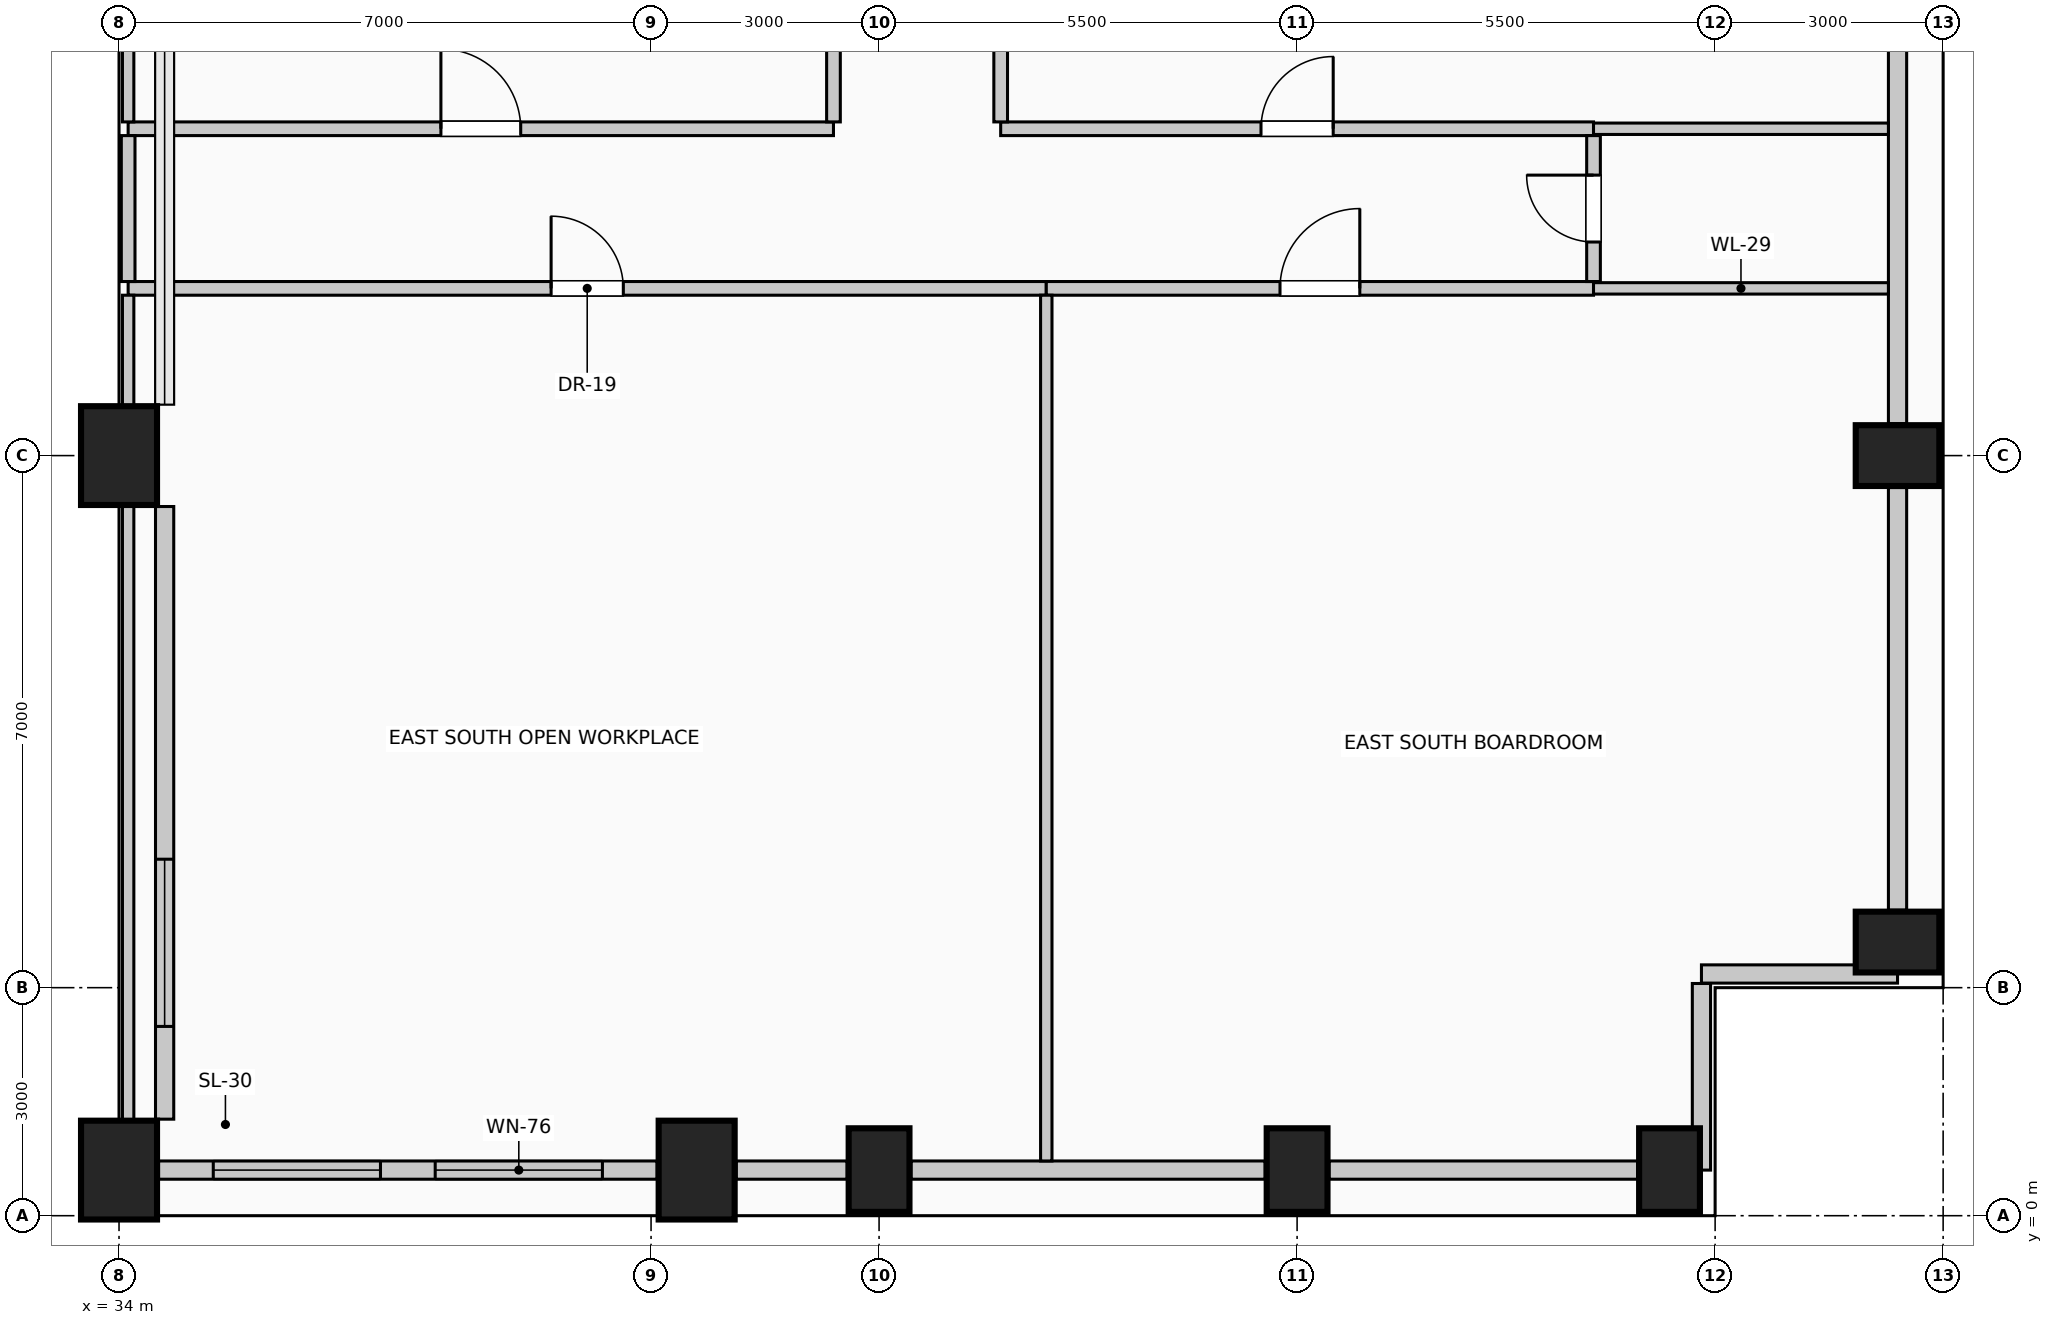
"""IFC4 building model, lengths in metres.
Left out: names, types, materials, properties, quantities, classifications, styles, units other than length and angle.
Written with IfcOpenShell. Run it as: python <this file> out.ifc"""

import sys

from ifc_helpers import new_model, si_unit, direction, frame, frame_2d, origin, origin_2d, place, context, subcontext, project, spatial, rectangle, extrude, element, fill, save


model = new_model("IFC4")
c1 = context("Model", 3, precision=1e-05, world=origin(), true_north=direction((0.0, 1.0)))
c2 = subcontext(c1, "Body", "Model", "MODEL_VIEW")
j1 = project(units=[si_unit("LENGTHUNIT", "METRE"), si_unit("PLANEANGLEUNIT", "RADIAN")], contexts=[c1])
p1 = place(None, origin())
s1 = spatial("IfcSite", under=j1, at=p1, CompositionType="ELEMENT")
p2 = place(p1, origin())
s2 = spatial("IfcBuilding", under=s1, at=p2, CompositionType="ELEMENT")
p3 = place(p2, frame((0.0, 0.0, 190.6)))
s3 = spatial("IfcBuildingStorey", under=s2, at=p3, CompositionType="ELEMENT", Elevation=190.6)
for number, where, z_axis, x_axis in (
    (1, (34.0, 0.6, 0.0), (0.0, 0.0, 1.0), (1.0, 0.0, 0.0)),
    (2, (41.6, 0.6, 0.0), (0.0, 0.0, 1.0), (1.0, 0.0, 0.0)),
):
    element("IfcColumn", number, at=place(p3, frame(where, z_axis=z_axis, x_axis=x_axis)), inside=s3, PredefinedType="COLUMN", context=c2, shape_type="SweptSolid", body=[
        extrude(rectangle(XDim=1.0, YDim=1.3, at=origin_2d()), origin(), (0.0, 0.0, 1.0), 4.0),
    ])
for number, where, z_axis, x_axis in (
    (3, (44.0, 0.6, 0.0), (0.0, 0.0, 1.0), (1.0, 0.0, 0.0)),
    (4, (49.5, 0.6, 0.0), (0.0, 0.0, 1.0), (1.0, 0.0, 0.0)),
    (5, (54.4, 0.6, 0.0), (0.0, 0.0, 1.0), (1.0, 0.0, 0.0)),
    (6, (57.4, 3.6, 0.0), (0.0, 0.0, 1.0), (0.0, 1.0, 0.0)),
    (7, (57.4, 10.0, 0.0), (0.0, 0.0, 1.0), (0.0, 1.0, 0.0)),
):
    element("IfcColumn", number, at=place(p3, frame(where, z_axis=z_axis, x_axis=x_axis)), inside=s3, PredefinedType="COLUMN", context=c2, shape_type="SweptSolid", body=[
        extrude(rectangle(XDim=0.8, YDim=1.1, at=origin_2d()), origin(), (0.0, 0.0, 1.0), 4.0),
    ])
p4 = place(p3, frame((34.0, 10.0, 0.0), z_axis=(0.0, 0.0, 1.0), x_axis=(1.0, 0.0, 0.0)))
e8 = element("IfcColumn", 8, at=p4, inside=s3, PredefinedType="COLUMN", context=c2, shape_type="SweptSolid", body=[
    extrude(rectangle(XDim=1.0, YDim=1.3, at=origin_2d()), origin(), (0.0, 0.0, 1.0), 4.0),
])
p5 = place(p3, frame((41.08, 0.6, 0.0), z_axis=(0.0, 0.0, 1.0), x_axis=(-1.0, 0.0, 0.0)))
e9 = element("IfcWall", 9, at=p5, inside=s3, PredefinedType="SOLIDWALL", context=c2, shape_type="SweptSolid", body=[
    extrude(rectangle(XDim=6.56, YDim=0.24, at=frame_2d((3.28, 0.0))), origin(), (0.0, 0.0, 1.0), 3.0),
])
p6 = place(p5, frame((0.72, 0.0, 0.42)))
e10 = element("IfcOpeningElement", 10, at=p6, cuts=e9, PredefinedType="OPENING", context=c2, shape_type="SweptSolid", body=[
    extrude(rectangle(XDim=2.2, YDim=1.95, at=frame_2d((1.1, 0.975))), frame((0.0, 0.13, 0.0), z_axis=(0.0, -1.0, 0.0), x_axis=(1.0, 0.0, 0.0)), (0.0, 0.0, 1.0), 0.26),
])
p7 = place(p5, frame((3.64, 0.0, 0.42)))
e11 = element("IfcOpeningElement", 11, at=p7, cuts=e9, PredefinedType="OPENING", context=c2, shape_type="SweptSolid", body=[
    extrude(rectangle(XDim=2.2, YDim=1.95, at=frame_2d((1.1, 0.975))), frame((0.0, 0.13, 0.0), z_axis=(0.0, -1.0, 0.0), x_axis=(1.0, 0.0, 0.0)), (0.0, 0.0, 1.0), 0.26),
])
p8 = place(p3, frame((43.58, 0.6, 0.0), z_axis=(0.0, 0.0, 1.0), x_axis=(-1.0, 0.0, 0.0)))
e12 = element("IfcWall", 12, at=p8, inside=s3, PredefinedType="SOLIDWALL", context=c2, shape_type="SweptSolid", body=[
    extrude(rectangle(XDim=1.46, YDim=0.24, at=frame_2d((0.73, 0.0))), origin(), (0.0, 0.0, 1.0), 3.0),
])
p9 = place(p3, frame((49.08, 0.6, 0.0), z_axis=(0.0, 0.0, 1.0), x_axis=(-1.0, 0.0, 0.0)))
e13 = element("IfcWall", 13, at=p9, inside=s3, PredefinedType="SOLIDWALL", context=c2, shape_type="SweptSolid", body=[
    extrude(rectangle(XDim=4.66, YDim=0.24, at=frame_2d((2.33, 0.0))), origin(), (0.0, 0.0, 1.0), 3.0),
])
p10 = place(p3, frame((53.98, 0.6, 0.0), z_axis=(0.0, 0.0, 1.0), x_axis=(-1.0, 0.0, 0.0)))
e14 = element("IfcWall", 14, at=p10, inside=s3, PredefinedType="SOLIDWALL", context=c2, shape_type="SweptSolid", body=[
    extrude(rectangle(XDim=4.06, YDim=0.24, at=frame_2d((2.03, 0.0))), origin(), (0.0, 0.0, 1.0), 3.0),
])
p11 = place(p3, frame((57.4, 9.58, 0.0), z_axis=(0.0, 0.0, 1.0), x_axis=(0.0, -1.0, 0.0)))
e15 = element("IfcWall", 15, at=p11, inside=s3, PredefinedType="SOLIDWALL", context=c2, shape_type="SweptSolid", body=[
    extrude(rectangle(XDim=5.56, YDim=0.24, at=frame_2d((2.78, 0.0))), origin(), (0.0, 0.0, 1.0), 3.0),
])
p12 = place(p3, frame((57.4, 17.58, 0.0), z_axis=(0.0, 0.0, 1.0), x_axis=(0.0, -1.0, 0.0)))
e16 = element("IfcWall", 16, at=p12, inside=s3, PredefinedType="SOLIDWALL", context=c2, shape_type="SweptSolid", body=[
    extrude(rectangle(XDim=7.16, YDim=0.24, at=frame_2d((3.58, 0.0))), origin(), (0.0, 0.0, 1.0), 3.0),
])
p13 = place(p3, frame((57.4, 3.18, 0.0), z_axis=(0.0, 0.0, 1.0), x_axis=(-1.0, 0.0, 0.0)))
e17 = element("IfcWall", 17, at=p13, inside=s3, PredefinedType="SOLIDWALL", context=c2, shape_type="SweptSolid", body=[
    extrude(rectangle(XDim=2.58, YDim=0.24, at=frame_2d((1.29, 0.0))), origin(), (0.0, 0.0, 1.0), 3.75),
])
p14 = place(p3, frame((54.82, 3.055, 0.0), z_axis=(0.0, 0.0, 1.0), x_axis=(0.0, -1.0, 0.0)))
e18 = element("IfcWall", 18, at=p14, inside=s3, PredefinedType="SOLIDWALL", context=c2, shape_type="SweptSolid", body=[
    extrude(rectangle(XDim=2.455, YDim=0.24, at=frame_2d((1.228, 0.0))), origin(), (0.0, 0.0, 1.0), 3.75),
])
p15 = place(p3, frame((34.6, 1.27, 0.0), z_axis=(0.0, 0.0, 1.0), x_axis=(0.0, 1.0, 0.0)))
e19 = element("IfcWall", 19, at=p15, inside=s3, PredefinedType="SOLIDWALL", context=c2, shape_type="SweptSolid", body=[
    extrude(rectangle(XDim=8.06, YDim=0.24, at=frame_2d((4.03, 0.0))), origin(), (0.0, 0.0, 1.0), 3.75),
])
p16 = place(p15, frame((1.22, 0.0, 0.42)))
e20 = element("IfcOpeningElement", 20, at=p16, cuts=e19, PredefinedType="OPENING", context=c2, shape_type="SweptSolid", body=[
    extrude(rectangle(XDim=2.2, YDim=1.95, at=frame_2d((1.1, 0.975))), frame((0.0, 0.13, 0.0), z_axis=(0.0, -1.0, 0.0), x_axis=(1.0, 0.0, 0.0)), (0.0, 0.0, 1.0), 0.26),
])
p17 = place(p3, frame((34.12, 12.2, 0.0), z_axis=(0.0, 0.0, 1.0), x_axis=(1.0, 0.0, 0.0)))
e21 = element("IfcWall", 21, at=p17, inside=s3, PredefinedType="PARTITIONING", context=c2, shape_type="SweptSolid", body=[
    extrude(rectangle(XDim=12.08, YDim=0.18, at=frame_2d((6.04, 0.0))), origin(), (0.0, 0.0, 1.0), 3.75),
])
p18 = place(p17, frame((5.565, 0.0, 0.0)))
e22 = element("IfcOpeningElement", 22, at=p18, cuts=e21, PredefinedType="OPENING", context=c2, shape_type="SweptSolid", body=[
    extrude(rectangle(XDim=0.95, YDim=2.15, at=frame_2d((0.475, 1.075))), frame((0.0, 0.1, 0.0), z_axis=(0.0, -1.0, 0.0), x_axis=(1.0, 0.0, 0.0)), (0.0, 0.0, 1.0), 0.2),
])
p19 = place(p3, frame((46.2, 12.2, 0.0), z_axis=(0.0, 0.0, 1.0), x_axis=(1.0, 0.0, 0.0)))
e23 = element("IfcWall", 23, at=p19, inside=s3, PredefinedType="PARTITIONING", context=c2, shape_type="SweptSolid", body=[
    extrude(rectangle(XDim=7.2, YDim=0.18, at=frame_2d((3.6, 0.0))), origin(), (0.0, 0.0, 1.0), 3.75),
])
p20 = place(p19, frame((3.075, 0.0, 0.0)))
e24 = element("IfcOpeningElement", 24, at=p20, cuts=e23, PredefinedType="OPENING", context=c2, shape_type="SweptSolid", body=[
    extrude(rectangle(XDim=1.05, YDim=2.15, at=frame_2d((0.525, 1.075))), frame((0.0, 0.1, 0.0), z_axis=(0.0, -1.0, 0.0), x_axis=(1.0, 0.0, 0.0)), (0.0, 0.0, 1.0), 0.2),
])
p21 = place(p3, frame((53.4, 12.2, 0.0), z_axis=(0.0, 0.0, 1.0), x_axis=(1.0, 0.0, 0.0)))
e25 = element("IfcWall", 25, at=p21, inside=s3, PredefinedType="PARTITIONING", context=c2, shape_type="SweptSolid", body=[
    extrude(rectangle(XDim=3.88, YDim=0.15, at=frame_2d((1.94, 0.0))), origin(), (0.0, 0.0, 1.0), 3.75),
])
p22 = place(p3, frame((34.12, 14.3, 0.0), z_axis=(0.0, 0.0, 1.0), x_axis=(1.0, 0.0, 0.0)))
e26 = element("IfcWall", 26, at=p22, inside=s3, PredefinedType="PARTITIONING", context=c2, shape_type="SweptSolid", body=[
    extrude(rectangle(XDim=9.28, YDim=0.18, at=frame_2d((4.64, 0.0))), origin(), (0.0, 0.0, 1.0), 3.75),
])
p23 = place(p22, frame((4.115, 0.0, 0.0)))
e27 = element("IfcOpeningElement", 27, at=p23, cuts=e26, PredefinedType="OPENING", context=c2, shape_type="SweptSolid", body=[
    extrude(rectangle(XDim=1.05, YDim=2.15, at=frame_2d((0.525, 1.075))), frame((0.0, 0.1, 0.0), z_axis=(0.0, -1.0, 0.0), x_axis=(1.0, 0.0, 0.0)), (0.0, 0.0, 1.0), 0.2),
])
p24 = place(p3, frame((45.6, 14.3, 0.0), z_axis=(0.0, 0.0, 1.0), x_axis=(1.0, 0.0, 0.0)))
e28 = element("IfcWall", 28, at=p24, inside=s3, PredefinedType="PARTITIONING", context=c2, shape_type="SweptSolid", body=[
    extrude(rectangle(XDim=7.8, YDim=0.18, at=frame_2d((3.9, 0.0))), origin(), (0.0, 0.0, 1.0), 3.75),
])
p25 = place(p24, frame((3.425, 0.0, 0.0)))
e29 = element("IfcOpeningElement", 29, at=p25, cuts=e28, PredefinedType="OPENING", context=c2, shape_type="SweptSolid", body=[
    extrude(rectangle(XDim=0.95, YDim=2.15, at=frame_2d((0.475, 1.075))), frame((0.0, 0.1, 0.0), z_axis=(0.0, -1.0, 0.0), x_axis=(1.0, 0.0, 0.0)), (0.0, 0.0, 1.0), 0.2),
])
p26 = place(p3, frame((53.4, 14.3, 0.0), z_axis=(0.0, 0.0, 1.0), x_axis=(1.0, 0.0, 0.0)))
e30 = element("IfcWall", 30, at=p26, inside=s3, PredefinedType="PARTITIONING", context=c2, shape_type="SweptSolid", body=[
    extrude(rectangle(XDim=3.88, YDim=0.15, at=frame_2d((1.94, 0.0))), origin(), (0.0, 0.0, 1.0), 3.75),
])
p27 = place(p3, frame((34.12, 1.25, 0.0), z_axis=(0.0, 0.0, 1.0), x_axis=(0.0, 1.0, 0.0)))
e31 = element("IfcWall", 31, at=p27, inside=s3, PredefinedType="PARTITIONING", context=c2, shape_type="SweptSolid", body=[
    extrude(rectangle(XDim=8.1, YDim=0.15, at=frame_2d((4.05, 0.0))), origin(), (0.0, 0.0, 1.0), 3.145),
])
p28 = place(p3, frame((34.12, 10.65, 0.0), z_axis=(0.0, 0.0, 1.0), x_axis=(0.0, 1.0, 0.0)))
e32 = element("IfcWall", 32, at=p28, inside=s3, PredefinedType="PARTITIONING", context=c2, shape_type="SweptSolid", body=[
    extrude(rectangle(XDim=1.46, YDim=0.15, at=frame_2d((0.73, 0.0))), origin(), (0.0, 0.0, 1.0), 3.145),
])
p29 = place(p3, frame((34.12, 12.29, 0.0), z_axis=(0.0, 0.0, 1.0), x_axis=(0.0, 1.0, 0.0)))
e33 = element("IfcWall", 33, at=p29, inside=s3, PredefinedType="PARTITIONING", context=c2, shape_type="SweptSolid", body=[
    extrude(rectangle(XDim=1.92, YDim=0.18, at=frame_2d((0.96, 0.0))), origin(), (0.0, 0.0, 1.0), 3.145),
])
p30 = place(p3, frame((34.12, 14.39, 0.0), z_axis=(0.0, 0.0, 1.0), x_axis=(0.0, 1.0, 0.0)))
e34 = element("IfcWall", 34, at=p30, inside=s3, PredefinedType="PARTITIONING", context=c2, shape_type="SweptSolid", body=[
    extrude(rectangle(XDim=2.96, YDim=0.15, at=frame_2d((1.48, 0.0))), origin(), (0.0, 0.0, 1.0), 3.145),
])
p31 = place(p3, frame((43.4, 14.39, 0.0), z_axis=(0.0, 0.0, 1.0), x_axis=(0.0, 1.0, 0.0)))
e35 = element("IfcWall", 35, at=p31, inside=s3, PredefinedType="PARTITIONING", context=c2, shape_type="SweptSolid", body=[
    extrude(rectangle(XDim=8.935, YDim=0.18, at=frame_2d((4.468, 0.0))), origin(), (0.0, 0.0, 1.0), 3.75),
])
p32 = place(p3, frame((45.6, 14.39, 0.0), z_axis=(0.0, 0.0, 1.0), x_axis=(0.0, 1.0, 0.0)))
e36 = element("IfcWall", 36, at=p32, inside=s3, PredefinedType="PARTITIONING", context=c2, shape_type="SweptSolid", body=[
    extrude(rectangle(XDim=14.148, YDim=0.18, at=frame_2d((7.074, 0.0))), origin(), (0.0, 0.0, 1.0), 3.75),
])
p33 = place(p3, frame((46.2, 0.72, 0.0), z_axis=(0.0, 0.0, 1.0), x_axis=(0.0, 1.0, 0.0)))
e37 = element("IfcWall", 37, at=p33, inside=s3, PredefinedType="PARTITIONING", context=c2, shape_type="SweptSolid", body=[
    extrude(rectangle(XDim=11.39, YDim=0.15, at=frame_2d((5.695, 0.0))), origin(), (0.0, 0.0, 1.0), 3.75),
])
p34 = place(p3, frame((53.4, 12.29, 0.0), z_axis=(0.0, 0.0, 1.0), x_axis=(0.0, 1.0, 0.0)))
e38 = element("IfcWall", 38, at=p34, inside=s3, PredefinedType="PARTITIONING", context=c2, shape_type="SweptSolid", body=[
    extrude(rectangle(XDim=1.92, YDim=0.18, at=frame_2d((0.96, 0.0))), origin(), (0.0, 0.0, 1.0), 3.75),
])
p35 = place(p34, frame((0.52, 0.0, 0.0)))
e39 = element("IfcOpeningElement", 39, at=p35, cuts=e38, PredefinedType="OPENING", context=c2, shape_type="SweptSolid", body=[
    extrude(rectangle(XDim=0.88, YDim=2.1, at=frame_2d((0.44, 1.05))), frame((0.0, 0.1, 0.0), z_axis=(0.0, -1.0, 0.0), x_axis=(1.0, 0.0, 0.0)), (0.0, 0.0, 1.0), 0.2),
])
p36 = place(p6, origin())
e40 = element("IfcWindow", 40, at=p36, inside=s3, PartitioningType="SINGLE_PANEL", PredefinedType="WINDOW", context=c2, shape_type="SweptSolid", body=[
    extrude(rectangle(XDim=2.2, YDim=1.95, at=frame_2d((1.1, 0.975))), frame((0.0, 0.03, 0.0), z_axis=(0.0, -1.0, 0.0), x_axis=(1.0, 0.0, 0.0)), (0.0, 0.0, 1.0), 0.06),
])
fill(e10, e40)
p37 = place(p7, origin())
e41 = element("IfcWindow", 41, at=p37, inside=s3, PartitioningType="SINGLE_PANEL", PredefinedType="WINDOW", context=c2, shape_type="SweptSolid", body=[
    extrude(rectangle(XDim=2.2, YDim=1.95, at=frame_2d((1.1, 0.975))), frame((0.0, 0.03, 0.0), z_axis=(0.0, -1.0, 0.0), x_axis=(1.0, 0.0, 0.0)), (0.0, 0.0, 1.0), 0.06),
])
fill(e11, e41)
p38 = place(p16, origin())
e42 = element("IfcWindow", 42, at=p38, inside=s3, PartitioningType="SINGLE_PANEL", PredefinedType="WINDOW", context=c2, shape_type="SweptSolid", body=[
    extrude(rectangle(XDim=2.2, YDim=1.95, at=frame_2d((1.1, 0.975))), frame((0.0, 0.03, 0.0), z_axis=(0.0, -1.0, 0.0), x_axis=(1.0, 0.0, 0.0)), (0.0, 0.0, 1.0), 0.06),
])
fill(e20, e42)
p39 = place(p18, origin())
e43 = element("IfcDoor", 43, at=p39, inside=s3, OperationType="SINGLE_SWING_LEFT", PredefinedType="DOOR", context=c2, shape_type="SweptSolid", body=[
    extrude(rectangle(XDim=0.95, YDim=2.15, at=frame_2d((0.475, 1.075))), frame((0.0, 0.025, 0.0), z_axis=(0.0, -1.0, 0.0), x_axis=(1.0, 0.0, 0.0)), (0.0, 0.0, 1.0), 0.05),
])
fill(e22, e43)
p40 = place(p20, origin())
e44 = element("IfcDoor", 44, at=p40, inside=s3, OperationType="SINGLE_SWING_RIGHT", PredefinedType="DOOR", context=c2, shape_type="SweptSolid", body=[
    extrude(rectangle(XDim=1.05, YDim=2.15, at=frame_2d((0.525, 1.075))), frame((0.0, 0.025, 0.0), z_axis=(0.0, -1.0, 0.0), x_axis=(1.0, 0.0, 0.0)), (0.0, 0.0, 1.0), 0.05),
])
fill(e24, e44)
p41 = place(p23, origin())
e45 = element("IfcDoor", 45, at=p41, inside=s3, OperationType="SINGLE_SWING_LEFT", PredefinedType="DOOR", context=c2, shape_type="SweptSolid", body=[
    extrude(rectangle(XDim=1.05, YDim=2.15, at=frame_2d((0.525, 1.075))), frame((0.0, 0.025, 0.0), z_axis=(0.0, -1.0, 0.0), x_axis=(1.0, 0.0, 0.0)), (0.0, 0.0, 1.0), 0.05),
])
fill(e27, e45)
p42 = place(p25, origin())
e46 = element("IfcDoor", 46, at=p42, inside=s3, OperationType="SINGLE_SWING_RIGHT", PredefinedType="DOOR", context=c2, shape_type="SweptSolid", body=[
    extrude(rectangle(XDim=0.95, YDim=2.15, at=frame_2d((0.475, 1.075))), frame((0.0, 0.025, 0.0), z_axis=(0.0, -1.0, 0.0), x_axis=(1.0, 0.0, 0.0)), (0.0, 0.0, 1.0), 0.05),
])
fill(e29, e46)
p43 = place(p35, origin())
e47 = element("IfcDoor", 47, at=p43, inside=s3, OperationType="SINGLE_SWING_RIGHT", PredefinedType="DOOR", context=c2, shape_type="SweptSolid", body=[
    extrude(rectangle(XDim=0.88, YDim=2.1, at=frame_2d((0.44, 1.05))), frame((0.0, 0.025, 0.0), z_axis=(0.0, -1.0, 0.0), x_axis=(1.0, 0.0, 0.0)), (0.0, 0.0, 1.0), 0.05),
])
fill(e39, e47)
save(model, sys.argv[1])
